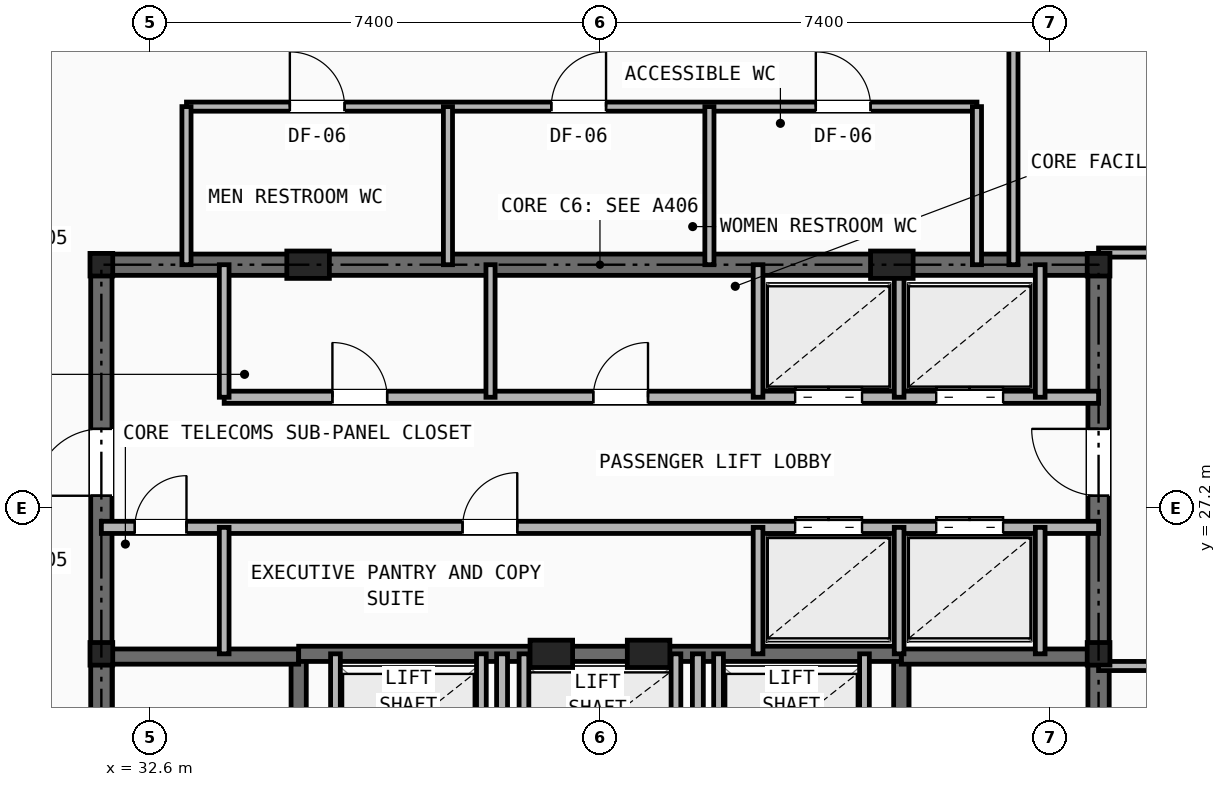
"""IFC4 building model, lengths in metres.
Left out: names, types, materials, properties, quantities, classifications, styles, units other than length and angle.
Written with IfcOpenShell. Run it as: python <this file> out.ifc"""

import sys

from ifc_helpers import new_model, si_unit, direction, frame, frame_2d, origin, origin_2d, place, context, subcontext, project, spatial, rectangle, i_section, extrude, element, fill, save


model = new_model("IFC4")
c1 = context("Model", 3, precision=1e-05, world=origin(), true_north=direction((0.0, 1.0)))
c2 = subcontext(c1, "Body", "Model", "MODEL_VIEW")
j1 = project(units=[si_unit("LENGTHUNIT", "METRE"), si_unit("PLANEANGLEUNIT", "RADIAN")], contexts=[c1])
p1 = place(None, origin())
s1 = spatial("IfcSite", under=j1, at=p1, CompositionType="ELEMENT")
p2 = place(p1, origin())
s2 = spatial("IfcBuilding", under=s1, at=p2, CompositionType="ELEMENT")
p3 = place(p2, frame((0.0, 0.0, 211.9)))
s3 = spatial("IfcBuildingStorey", under=s2, at=p3, CompositionType="ELEMENT", Elevation=211.9)
for number, where, z_axis, x_axis in (
    (1, (31.8, 24.8, 0.0), (0.0, 0.0, 1.0), (1.0, 0.0, 0.0)),
    (2, (48.2, 24.8, 0.0), (0.0, 0.0, 1.0), (1.0, 0.0, 0.0)),
    (3, (31.8, 31.2, 0.0), (0.0, 0.0, 1.0), (1.0, 0.0, 0.0)),
    (4, (48.2, 31.2, 0.0), (0.0, 0.0, 1.0), (1.0, 0.0, 0.0)),
):
    element("IfcColumn", number, at=place(p3, frame(where, z_axis=z_axis, x_axis=x_axis)), inside=s3, PredefinedType="COLUMN", context=c2, shape_type="SweptSolid", body=[
        extrude(i_section(OverallWidth=0.374, OverallDepth=0.372, WebThickness=0.016, FlangeThickness=0.026, at=origin_2d()), origin(), (0.0, 0.0, 1.0), 3.5),
    ])
for number, where, z_axis, x_axis in (
    (5, (35.2, 31.2, 0.0), (0.0, 0.0, 1.0), (1.0, 0.0, 0.0)),
    (6, (44.8, 31.2, 0.0), (0.0, 0.0, 1.0), (1.0, 0.0, 0.0)),
    (7, (39.2, 24.8, 0.0), (0.0, 0.0, 1.0), (1.0, 0.0, 0.0)),
    (8, (40.8, 24.8, 0.0), (0.0, 0.0, 1.0), (1.0, 0.0, 0.0)),
):
    element("IfcColumn", number, at=place(p3, frame(where, z_axis=z_axis, x_axis=x_axis)), inside=s3, PredefinedType="PILASTER", context=c2, shape_type="SweptSolid", body=[
        extrude(rectangle(XDim=0.7, YDim=0.45, at=origin_2d()), origin(), (0.0, 0.0, 1.0), 3.5),
    ])
p4 = place(p3, frame((31.8, 31.2, 0.0), z_axis=(0.0, 0.0, 1.0), x_axis=(1.0, 0.0, 0.0)))
e9 = element("IfcWall", 9, at=p4, inside=s3, PredefinedType="SHEAR", context=c2, shape_type="SweptSolid", body=[
    extrude(rectangle(XDim=16.4, YDim=0.35, at=frame_2d((8.2, 0.0))), origin(), (0.0, 0.0, 1.0), 3.25),
])
p5 = place(p3, frame((31.8, 16.4, 0.0), z_axis=(0.0, 0.0, 1.0), x_axis=(0.0, 1.0, 0.0)))
e10 = element("IfcWall", 10, at=p5, inside=s3, PredefinedType="SHEAR", context=c2, shape_type="SweptSolid", body=[
    extrude(rectangle(XDim=14.8, YDim=0.35, at=frame_2d((7.4, 0.0))), origin(), (0.0, 0.0, 1.0), 3.25),
])
p6 = place(p5, frame((11.0, 0.0, 0.0)))
e11 = element("IfcOpeningElement", 11, at=p6, cuts=e10, PredefinedType="OPENING", context=c2, shape_type="SweptSolid", body=[
    extrude(rectangle(XDim=1.1, YDim=2.15, at=frame_2d((0.55, 1.075))), frame((0.0, 0.185, 0.0), z_axis=(0.0, -1.0, 0.0), x_axis=(1.0, 0.0, 0.0)), (0.0, 0.0, 1.0), 0.37),
])
p7 = place(p3, frame((48.2, 16.4, 0.0), z_axis=(0.0, 0.0, 1.0), x_axis=(0.0, 1.0, 0.0)))
e12 = element("IfcWall", 12, at=p7, inside=s3, PredefinedType="SHEAR", context=c2, shape_type="SweptSolid", body=[
    extrude(rectangle(XDim=14.8, YDim=0.35, at=frame_2d((7.4, 0.0))), origin(), (0.0, 0.0, 1.0), 3.25),
])
p8 = place(p7, frame((11.0, 0.0, 0.0)))
e13 = element("IfcOpeningElement", 13, at=p8, cuts=e12, PredefinedType="OPENING", context=c2, shape_type="SweptSolid", body=[
    extrude(rectangle(XDim=1.1, YDim=2.15, at=frame_2d((0.55, 1.075))), frame((0.0, 0.185, 0.0), z_axis=(0.0, -1.0, 0.0), x_axis=(1.0, 0.0, 0.0)), (0.0, 0.0, 1.0), 0.37),
])
p9 = place(p3, frame((35.045, 16.4, 0.0), z_axis=(0.0, 0.0, 1.0), x_axis=(0.0, 1.0, 0.0)))
e14 = element("IfcWall", 14, at=p9, inside=s3, PredefinedType="SHEAR", context=c2, shape_type="SweptSolid", body=[
    extrude(rectangle(XDim=8.4, YDim=0.25, at=frame_2d((4.2, 0.0))), origin(), (0.0, 0.0, 1.0), 3.25),
])
p10 = place(p9, frame((0.45, 0.0, 0.0)))
e15 = element("IfcOpeningElement", 15, at=p10, cuts=e14, PredefinedType="OPENING", context=c2, shape_type="SweptSolid", body=[
    extrude(rectangle(XDim=0.95, YDim=2.1, at=frame_2d((0.475, 1.05))), frame((0.0, 0.135, 0.0), z_axis=(0.0, -1.0, 0.0), x_axis=(1.0, 0.0, 0.0)), (0.0, 0.0, 1.0), 0.27),
])
p11 = place(p3, frame((31.8, 24.755, 0.0), z_axis=(0.0, 0.0, 1.0), x_axis=(1.0, 0.0, 0.0)))
e16 = element("IfcWall", 16, at=p11, inside=s3, PredefinedType="SHEAR", context=c2, shape_type="SweptSolid", body=[
    extrude(rectangle(XDim=3.245, YDim=0.25, at=frame_2d((1.623, 0.0))), origin(), (0.0, 0.0, 1.0), 3.25),
])
p12 = place(p3, frame((44.955, 16.4, 0.0), z_axis=(0.0, 0.0, 1.0), x_axis=(0.0, 1.0, 0.0)))
e17 = element("IfcWall", 17, at=p12, inside=s3, PredefinedType="SHEAR", context=c2, shape_type="SweptSolid", body=[
    extrude(rectangle(XDim=8.4, YDim=0.25, at=frame_2d((4.2, 0.0))), origin(), (0.0, 0.0, 1.0), 3.25),
])
p13 = place(p12, frame((0.45, 0.0, 0.0)))
e18 = element("IfcOpeningElement", 18, at=p13, cuts=e17, PredefinedType="OPENING", context=c2, shape_type="SweptSolid", body=[
    extrude(rectangle(XDim=0.95, YDim=2.1, at=frame_2d((0.475, 1.05))), frame((0.0, 0.135, 0.0), z_axis=(0.0, -1.0, 0.0), x_axis=(1.0, 0.0, 0.0)), (0.0, 0.0, 1.0), 0.27),
])
p14 = place(p3, frame((44.955, 24.755, 0.0), z_axis=(0.0, 0.0, 1.0), x_axis=(1.0, 0.0, 0.0)))
e19 = element("IfcWall", 19, at=p14, inside=s3, PredefinedType="SHEAR", context=c2, shape_type="SweptSolid", body=[
    extrude(rectangle(XDim=3.245, YDim=0.25, at=frame_2d((1.623, 0.0))), origin(), (0.0, 0.0, 1.0), 3.25),
])
p15 = place(p3, frame((35.045, 24.8, 0.0), z_axis=(0.0, 0.0, 1.0), x_axis=(1.0, 0.0, 0.0)))
e20 = element("IfcWall", 20, at=p15, inside=s3, PredefinedType="SHEAR", context=c2, shape_type="SweptSolid", body=[
    extrude(rectangle(XDim=9.91, YDim=0.25, at=frame_2d((4.955, 0.0))), origin(), (0.0, 0.0, 1.0), 3.25),
])
p16 = place(p3, frame((38.39, 16.4, 0.0), z_axis=(0.0, 0.0, 1.0), x_axis=(0.0, 1.0, 0.0)))
e21 = element("IfcWall", 21, at=p16, inside=s3, PredefinedType="PARTITIONING", context=c2, shape_type="SweptSolid", body=[
    extrude(rectangle(XDim=8.4, YDim=0.18, at=frame_2d((4.2, 0.0))), origin(), (0.0, 0.0, 1.0), 2.978),
])
p17 = place(p16, frame((3.85, 0.0, 0.0)))
e22 = element("IfcOpeningElement", 22, at=p17, cuts=e21, PredefinedType="OPENING", context=c2, shape_type="SweptSolid", body=[
    extrude(rectangle(XDim=0.95, YDim=2.1, at=frame_2d((0.475, 1.05))), frame((0.0, 0.1, 0.0), z_axis=(0.0, -1.0, 0.0), x_axis=(1.0, 0.0, 0.0)), (0.0, 0.0, 1.0), 0.2),
])
p18 = place(p3, frame((41.61, 16.4, 0.0), z_axis=(0.0, 0.0, 1.0), x_axis=(0.0, 1.0, 0.0)))
e23 = element("IfcWall", 23, at=p18, inside=s3, PredefinedType="PARTITIONING", context=c2, shape_type="SweptSolid", body=[
    extrude(rectangle(XDim=8.4, YDim=0.18, at=frame_2d((4.2, 0.0))), origin(), (0.0, 0.0, 1.0), 2.978),
])
for number, where, z_axis, x_axis in (
    (24, (35.65, 22.48, 0.0), (0.0, 0.0, 1.0), (0.0, 1.0, 0.0)),
    (25, (38.05, 22.48, 0.0), (0.0, 0.0, 1.0), (0.0, 1.0, 0.0)),
    (26, (41.95, 22.48, 0.0), (0.0, 0.0, 1.0), (0.0, 1.0, 0.0)),
    (27, (44.35, 22.48, 0.0), (0.0, 0.0, 1.0), (0.0, 1.0, 0.0)),
    (28, (38.75, 22.48, 0.0), (0.0, 0.0, 1.0), (0.0, 1.0, 0.0)),
    (29, (41.25, 22.48, 0.0), (0.0, 0.0, 1.0), (0.0, 1.0, 0.0)),
):
    element("IfcWall", number, at=place(p3, frame(where, z_axis=z_axis, x_axis=x_axis)), inside=s3, PredefinedType="SOLIDWALL", context=c2, shape_type="SweptSolid", body=[
        extrude(rectangle(XDim=2.32, YDim=0.16, at=frame_2d((1.16, 0.0))), origin(), (0.0, 0.0, 1.0), 3.25),
    ])
p19 = place(p3, frame((33.82, 29.02, 0.0), z_axis=(0.0, 0.0, 1.0), x_axis=(1.0, 0.0, 0.0)))
e30 = element("IfcWall", 30, at=p19, inside=s3, PredefinedType="SOLIDWALL", context=c2, shape_type="SweptSolid", body=[
    extrude(rectangle(XDim=14.38, YDim=0.2, at=frame_2d((7.19, 0.0))), origin(), (0.0, 0.0, 1.0), 2.705),
])
p20 = place(p19, frame((1.78, 0.0, 0.0)))
e31 = element("IfcOpeningElement", 31, at=p20, cuts=e30, PredefinedType="OPENING", context=c2, shape_type="SweptSolid", body=[
    extrude(rectangle(XDim=0.9, YDim=2.1, at=frame_2d((0.45, 1.05))), frame((0.0, 0.11, 0.0), z_axis=(0.0, -1.0, 0.0), x_axis=(1.0, 0.0, 0.0)), (0.0, 0.0, 1.0), 0.22),
])
p21 = place(p19, frame((6.07, 0.0, 0.0)))
e32 = element("IfcOpeningElement", 32, at=p21, cuts=e30, PredefinedType="OPENING", context=c2, shape_type="SweptSolid", body=[
    extrude(rectangle(XDim=0.9, YDim=2.1, at=frame_2d((0.45, 1.05))), frame((0.0, 0.11, 0.0), z_axis=(0.0, -1.0, 0.0), x_axis=(1.0, 0.0, 0.0)), (0.0, 0.0, 1.0), 0.22),
])
p22 = place(p19, frame((9.39, 0.0, 0.0)))
e33 = element("IfcOpeningElement", 33, at=p22, cuts=e30, PredefinedType="OPENING", context=c2, shape_type="SweptSolid", body=[
    extrude(rectangle(XDim=1.1, YDim=2.15, at=frame_2d((0.55, 1.075))), frame((0.0, 0.11, 0.0), z_axis=(0.0, -1.0, 0.0), x_axis=(1.0, 0.0, 0.0)), (0.0, 0.0, 1.0), 0.22),
])
p23 = place(p19, frame((11.71, 0.0, 0.0)))
e34 = element("IfcOpeningElement", 34, at=p23, cuts=e30, PredefinedType="OPENING", context=c2, shape_type="SweptSolid", body=[
    extrude(rectangle(XDim=1.1, YDim=2.15, at=frame_2d((0.55, 1.075))), frame((0.0, 0.11, 0.0), z_axis=(0.0, -1.0, 0.0), x_axis=(1.0, 0.0, 0.0)), (0.0, 0.0, 1.0), 0.22),
])
p24 = place(p3, frame((31.8, 26.88, 0.0), z_axis=(0.0, 0.0, 1.0), x_axis=(1.0, 0.0, 0.0)))
e35 = element("IfcWall", 35, at=p24, inside=s3, PredefinedType="SOLIDWALL", context=c2, shape_type="SweptSolid", body=[
    extrude(rectangle(XDim=16.4, YDim=0.2, at=frame_2d((8.2, 0.0))), origin(), (0.0, 0.0, 1.0), 2.705),
])
p25 = place(p24, frame((0.55, 0.0, 0.0)))
e36 = element("IfcOpeningElement", 36, at=p25, cuts=e35, PredefinedType="OPENING", context=c2, shape_type="SweptSolid", body=[
    extrude(rectangle(XDim=0.85, YDim=2.05, at=frame_2d((0.425, 1.025))), frame((0.0, 0.11, 0.0), z_axis=(0.0, -1.0, 0.0), x_axis=(1.0, 0.0, 0.0)), (0.0, 0.0, 1.0), 0.22),
])
p26 = place(p24, frame((5.94, 0.0, 0.0)))
e37 = element("IfcOpeningElement", 37, at=p26, cuts=e35, PredefinedType="OPENING", context=c2, shape_type="SweptSolid", body=[
    extrude(rectangle(XDim=0.9, YDim=2.1, at=frame_2d((0.45, 1.05))), frame((0.0, 0.11, 0.0), z_axis=(0.0, -1.0, 0.0), x_axis=(1.0, 0.0, 0.0)), (0.0, 0.0, 1.0), 0.22),
])
p27 = place(p24, frame((11.41, 0.0, 0.0)))
e38 = element("IfcOpeningElement", 38, at=p27, cuts=e35, PredefinedType="OPENING", context=c2, shape_type="SweptSolid", body=[
    extrude(rectangle(XDim=1.1, YDim=2.15, at=frame_2d((0.55, 1.075))), frame((0.0, 0.11, 0.0), z_axis=(0.0, -1.0, 0.0), x_axis=(1.0, 0.0, 0.0)), (0.0, 0.0, 1.0), 0.22),
])
p28 = place(p24, frame((13.73, 0.0, 0.0)))
e39 = element("IfcOpeningElement", 39, at=p28, cuts=e35, PredefinedType="OPENING", context=c2, shape_type="SweptSolid", body=[
    extrude(rectangle(XDim=1.1, YDim=2.15, at=frame_2d((0.55, 1.075))), frame((0.0, 0.11, 0.0), z_axis=(0.0, -1.0, 0.0), x_axis=(1.0, 0.0, 0.0)), (0.0, 0.0, 1.0), 0.22),
])
p29 = place(p3, frame((33.82, 29.02, 0.0), z_axis=(0.0, 0.0, 1.0), x_axis=(0.0, 1.0, 0.0)))
e40 = element("IfcWall", 40, at=p29, inside=s3, PredefinedType="SOLIDWALL", context=c2, shape_type="SweptSolid", body=[
    extrude(rectangle(XDim=2.18, YDim=0.16, at=frame_2d((1.09, 0.0))), origin(), (0.0, 0.0, 1.0), 2.978),
])
p30 = place(p3, frame((33.82, 24.8, 0.0), z_axis=(0.0, 0.0, 1.0), x_axis=(0.0, 1.0, 0.0)))
e41 = element("IfcWall", 41, at=p30, inside=s3, PredefinedType="SOLIDWALL", context=c2, shape_type="SweptSolid", body=[
    extrude(rectangle(XDim=2.08, YDim=0.16, at=frame_2d((1.04, 0.0))), origin(), (0.0, 0.0, 1.0), 3.25),
])
p31 = place(p3, frame((38.2, 29.02, 0.0), z_axis=(0.0, 0.0, 1.0), x_axis=(0.0, 1.0, 0.0)))
e42 = element("IfcWall", 42, at=p31, inside=s3, PredefinedType="PARTITIONING", context=c2, shape_type="SweptSolid", body=[
    extrude(rectangle(XDim=2.18, YDim=0.15, at=frame_2d((1.09, 0.0))), origin(), (0.0, 0.0, 1.0), 2.978),
])
for number, where, z_axis, x_axis in (
    (43, (42.6, 29.02, 0.0), (0.0, 0.0, 1.0), (0.0, 1.0, 0.0)),
    (44, (44.92, 29.02, 0.0), (0.0, 0.0, 1.0), (0.0, 1.0, 0.0)),
    (45, (47.24, 29.02, 0.0), (0.0, 0.0, 1.0), (0.0, 1.0, 0.0)),
):
    element("IfcWall", number, at=place(p3, frame(where, z_axis=z_axis, x_axis=x_axis)), inside=s3, PredefinedType="SOLIDWALL", context=c2, shape_type="SweptSolid", body=[
        extrude(rectangle(XDim=2.18, YDim=0.16, at=frame_2d((1.09, 0.0))), origin(), (0.0, 0.0, 1.0), 2.978),
    ])
for number, where, z_axis, x_axis in (
    (46, (42.6, 24.8, 0.0), (0.0, 0.0, 1.0), (0.0, 1.0, 0.0)),
    (47, (44.92, 24.8, 0.0), (0.0, 0.0, 1.0), (0.0, 1.0, 0.0)),
    (48, (47.24, 24.8, 0.0), (0.0, 0.0, 1.0), (0.0, 1.0, 0.0)),
):
    element("IfcWall", number, at=place(p3, frame(where, z_axis=z_axis, x_axis=x_axis)), inside=s3, PredefinedType="SOLIDWALL", context=c2, shape_type="SweptSolid", body=[
        extrude(rectangle(XDim=2.08, YDim=0.16, at=frame_2d((1.04, 0.0))), origin(), (0.0, 0.0, 1.0), 3.25),
    ])
p32 = place(p3, frame((33.2, 33.8, 0.0), z_axis=(0.0, 0.0, 1.0), x_axis=(1.0, 0.0, 0.0)))
e49 = element("IfcWall", 49, at=p32, inside=s3, PredefinedType="PARTITIONING", context=c2, shape_type="SweptSolid", body=[
    extrude(rectangle(XDim=13.0, YDim=0.15, at=frame_2d((6.5, 0.0))), origin(), (0.0, 0.0, 1.0), 3.25),
])
p33 = place(p32, frame((1.7, 0.0, 0.0)))
e50 = element("IfcOpeningElement", 50, at=p33, cuts=e49, PredefinedType="OPENING", context=c2, shape_type="SweptSolid", body=[
    extrude(rectangle(XDim=0.9, YDim=2.1, at=frame_2d((0.45, 1.05))), frame((0.0, 0.085, 0.0), z_axis=(0.0, -1.0, 0.0), x_axis=(1.0, 0.0, 0.0)), (0.0, 0.0, 1.0), 0.17),
])
p34 = place(p32, frame((6.0, 0.0, 0.0)))
e51 = element("IfcOpeningElement", 51, at=p34, cuts=e49, PredefinedType="OPENING", context=c2, shape_type="SweptSolid", body=[
    extrude(rectangle(XDim=0.9, YDim=2.1, at=frame_2d((0.45, 1.05))), frame((0.0, 0.085, 0.0), z_axis=(0.0, -1.0, 0.0), x_axis=(1.0, 0.0, 0.0)), (0.0, 0.0, 1.0), 0.17),
])
p35 = place(p32, frame((10.35, 0.0, 0.0)))
e52 = element("IfcOpeningElement", 52, at=p35, cuts=e49, PredefinedType="OPENING", context=c2, shape_type="SweptSolid", body=[
    extrude(rectangle(XDim=0.9, YDim=2.1, at=frame_2d((0.45, 1.05))), frame((0.0, 0.085, 0.0), z_axis=(0.0, -1.0, 0.0), x_axis=(1.0, 0.0, 0.0)), (0.0, 0.0, 1.0), 0.17),
])
for number, where, z_axis, x_axis in (
    (53, (33.2, 31.2, 0.0), (0.0, 0.0, 1.0), (0.0, 1.0, 0.0)),
    (54, (46.2, 31.2, 0.0), (0.0, 0.0, 1.0), (0.0, 1.0, 0.0)),
    (55, (37.5, 31.2, 0.0), (0.0, 0.0, 1.0), (0.0, 1.0, 0.0)),
    (56, (41.8, 31.2, 0.0), (0.0, 0.0, 1.0), (0.0, 1.0, 0.0)),
):
    element("IfcWall", number, at=place(p3, frame(where, z_axis=z_axis, x_axis=x_axis)), inside=s3, PredefinedType="PARTITIONING", context=c2, shape_type="SweptSolid", body=[
        extrude(rectangle(XDim=2.6, YDim=0.15, at=frame_2d((1.3, 0.0))), origin(), (0.0, 0.0, 1.0), 2.978),
    ])
p36 = place(p3, frame((46.8, 31.2, 0.0), z_axis=(0.0, 0.0, 1.0), x_axis=(0.0, 1.0, 0.0)))
e57 = element("IfcWall", 57, at=p36, inside=s3, PredefinedType="PARTITIONING", context=c2, shape_type="SweptSolid", body=[
    extrude(rectangle(XDim=4.5, YDim=0.15, at=frame_2d((2.25, 0.0))), origin(), (0.0, 0.0, 1.0), 2.978),
])
p37 = place(p3, frame((48.2, 24.6, 0.0), z_axis=(0.0, 0.0, 1.0), x_axis=(1.0, 0.0, 0.0)))
e58 = element("IfcWall", 58, at=p37, inside=s3, PredefinedType="PARTITIONING", context=c2, shape_type="SweptSolid", body=[
    extrude(rectangle(XDim=10.492, YDim=0.15, at=frame_2d((5.246, 0.0))), origin(), (0.0, 0.0, 1.0), 2.628),
])
p38 = place(p37, frame((1.4, 0.0, 0.0)))
e59 = element("IfcOpeningElement", 59, at=p38, cuts=e58, PredefinedType="OPENING", context=c2, shape_type="SweptSolid", body=[
    extrude(rectangle(XDim=0.95, YDim=2.1, at=frame_2d((0.475, 1.05))), frame((0.0, 0.085, 0.0), z_axis=(0.0, -1.0, 0.0), x_axis=(1.0, 0.0, 0.0)), (0.0, 0.0, 1.0), 0.17),
])
p39 = place(p3, frame((48.2, 31.4, 0.0), z_axis=(0.0, 0.0, 1.0), x_axis=(1.0, 0.0, 0.0)))
e60 = element("IfcWall", 60, at=p39, inside=s3, PredefinedType="PARTITIONING", context=c2, shape_type="SweptSolid", body=[
    extrude(rectangle(XDim=5.896, YDim=0.15, at=frame_2d((2.948, 0.0))), origin(), (0.0, 0.0, 1.0), 2.265),
])
p40 = place(p39, frame((1.4, 0.0, 0.0)))
e61 = element("IfcOpeningElement", 61, at=p40, cuts=e60, PredefinedType="OPENING", context=c2, shape_type="SweptSolid", body=[
    extrude(rectangle(XDim=0.95, YDim=2.1, at=frame_2d((0.475, 1.05))), frame((0.0, 0.085, 0.0), z_axis=(0.0, -1.0, 0.0), x_axis=(1.0, 0.0, 0.0)), (0.0, 0.0, 1.0), 0.17),
])
p41 = place(p25, origin())
e62 = element("IfcDoor", 62, at=p41, inside=s3, OperationType="SINGLE_SWING_RIGHT", PredefinedType="DOOR", context=c2, shape_type="SweptSolid", body=[
    extrude(rectangle(XDim=0.85, YDim=2.05, at=frame_2d((0.425, 1.025))), frame((0.0, 0.025, 0.0), z_axis=(0.0, -1.0, 0.0), x_axis=(1.0, 0.0, 0.0)), (0.0, 0.0, 1.0), 0.05),
])
fill(e36, e62)
p42 = place(p6, origin())
e63 = element("IfcDoor", 63, at=p42, inside=s3, OperationType="SINGLE_SWING_LEFT", PredefinedType="DOOR", context=c2, shape_type="SweptSolid", body=[
    extrude(rectangle(XDim=1.1, YDim=2.15, at=frame_2d((0.55, 1.075))), frame((0.0, 0.025, 0.0), z_axis=(0.0, -1.0, 0.0), x_axis=(1.0, 0.0, 0.0)), (0.0, 0.0, 1.0), 0.05),
])
fill(e11, e63)
p43 = place(p8, origin())
e64 = element("IfcDoor", 64, at=p43, inside=s3, OperationType="SINGLE_SWING_RIGHT", PredefinedType="DOOR", context=c2, shape_type="SweptSolid", body=[
    extrude(rectangle(XDim=1.1, YDim=2.15, at=frame_2d((0.55, 1.075))), frame((0.0, 0.025, 0.0), z_axis=(0.0, -1.0, 0.0), x_axis=(1.0, 0.0, 0.0)), (0.0, 0.0, 1.0), 0.05),
])
fill(e13, e64)
p44 = place(p20, origin())
e65 = element("IfcDoor", 65, at=p44, inside=s3, OperationType="SINGLE_SWING_LEFT", PredefinedType="DOOR", context=c2, shape_type="SweptSolid", body=[
    extrude(rectangle(XDim=0.9, YDim=2.1, at=frame_2d((0.45, 1.05))), frame((0.0, 0.025, 0.0), z_axis=(0.0, -1.0, 0.0), x_axis=(1.0, 0.0, 0.0)), (0.0, 0.0, 1.0), 0.05),
])
fill(e31, e65)
p45 = place(p21, origin())
e66 = element("IfcDoor", 66, at=p45, inside=s3, OperationType="SINGLE_SWING_RIGHT", PredefinedType="DOOR", context=c2, shape_type="SweptSolid", body=[
    extrude(rectangle(XDim=0.9, YDim=2.1, at=frame_2d((0.45, 1.05))), frame((0.0, 0.025, 0.0), z_axis=(0.0, -1.0, 0.0), x_axis=(1.0, 0.0, 0.0)), (0.0, 0.0, 1.0), 0.05),
])
fill(e32, e66)
p46 = place(p26, origin())
e67 = element("IfcDoor", 67, at=p46, inside=s3, OperationType="SINGLE_SWING_RIGHT", PredefinedType="DOOR", context=c2, shape_type="SweptSolid", body=[
    extrude(rectangle(XDim=0.9, YDim=2.1, at=frame_2d((0.45, 1.05))), frame((0.0, 0.025, 0.0), z_axis=(0.0, -1.0, 0.0), x_axis=(1.0, 0.0, 0.0)), (0.0, 0.0, 1.0), 0.05),
])
fill(e37, e67)
p47 = place(p22, origin())
e68 = element("IfcDoor", 68, at=p47, inside=s3, OperationType="DOUBLE_DOOR_SLIDING", PredefinedType="DOOR", context=c2, shape_type="SweptSolid", body=[
    extrude(rectangle(XDim=1.1, YDim=2.15, at=frame_2d((0.55, 1.075))), frame((0.0, 0.025, 0.0), z_axis=(0.0, -1.0, 0.0), x_axis=(1.0, 0.0, 0.0)), (0.0, 0.0, 1.0), 0.05),
])
fill(e33, e68)
p48 = place(p23, origin())
e69 = element("IfcDoor", 69, at=p48, inside=s3, OperationType="DOUBLE_DOOR_SLIDING", PredefinedType="DOOR", context=c2, shape_type="SweptSolid", body=[
    extrude(rectangle(XDim=1.1, YDim=2.15, at=frame_2d((0.55, 1.075))), frame((0.0, 0.025, 0.0), z_axis=(0.0, -1.0, 0.0), x_axis=(1.0, 0.0, 0.0)), (0.0, 0.0, 1.0), 0.05),
])
fill(e34, e69)
p49 = place(p27, origin())
e70 = element("IfcDoor", 70, at=p49, inside=s3, OperationType="DOUBLE_DOOR_SLIDING", PredefinedType="DOOR", context=c2, shape_type="SweptSolid", body=[
    extrude(rectangle(XDim=1.1, YDim=2.15, at=frame_2d((0.55, 1.075))), frame((0.0, 0.025, 0.0), z_axis=(0.0, -1.0, 0.0), x_axis=(1.0, 0.0, 0.0)), (0.0, 0.0, 1.0), 0.05),
])
fill(e38, e70)
p50 = place(p28, origin())
e71 = element("IfcDoor", 71, at=p50, inside=s3, OperationType="DOUBLE_DOOR_SLIDING", PredefinedType="DOOR", context=c2, shape_type="SweptSolid", body=[
    extrude(rectangle(XDim=1.1, YDim=2.15, at=frame_2d((0.55, 1.075))), frame((0.0, 0.025, 0.0), z_axis=(0.0, -1.0, 0.0), x_axis=(1.0, 0.0, 0.0)), (0.0, 0.0, 1.0), 0.05),
])
fill(e39, e71)
p51 = place(p33, origin())
e72 = element("IfcDoor", 72, at=p51, inside=s3, OperationType="SINGLE_SWING_LEFT", PredefinedType="DOOR", context=c2, shape_type="SweptSolid", body=[
    extrude(rectangle(XDim=0.9, YDim=2.1, at=frame_2d((0.45, 1.05))), frame((0.0, 0.025, 0.0), z_axis=(0.0, -1.0, 0.0), x_axis=(1.0, 0.0, 0.0)), (0.0, 0.0, 1.0), 0.05),
])
fill(e50, e72)
p52 = place(p34, origin())
e73 = element("IfcDoor", 73, at=p52, inside=s3, OperationType="SINGLE_SWING_RIGHT", PredefinedType="DOOR", context=c2, shape_type="SweptSolid", body=[
    extrude(rectangle(XDim=0.9, YDim=2.1, at=frame_2d((0.45, 1.05))), frame((0.0, 0.025, 0.0), z_axis=(0.0, -1.0, 0.0), x_axis=(1.0, 0.0, 0.0)), (0.0, 0.0, 1.0), 0.05),
])
fill(e51, e73)
p53 = place(p35, origin())
e74 = element("IfcDoor", 74, at=p53, inside=s3, OperationType="SINGLE_SWING_LEFT", PredefinedType="DOOR", context=c2, shape_type="SweptSolid", body=[
    extrude(rectangle(XDim=0.9, YDim=2.1, at=frame_2d((0.45, 1.05))), frame((0.0, 0.025, 0.0), z_axis=(0.0, -1.0, 0.0), x_axis=(1.0, 0.0, 0.0)), (0.0, 0.0, 1.0), 0.05),
])
fill(e52, e74)
save(model, sys.argv[1])
